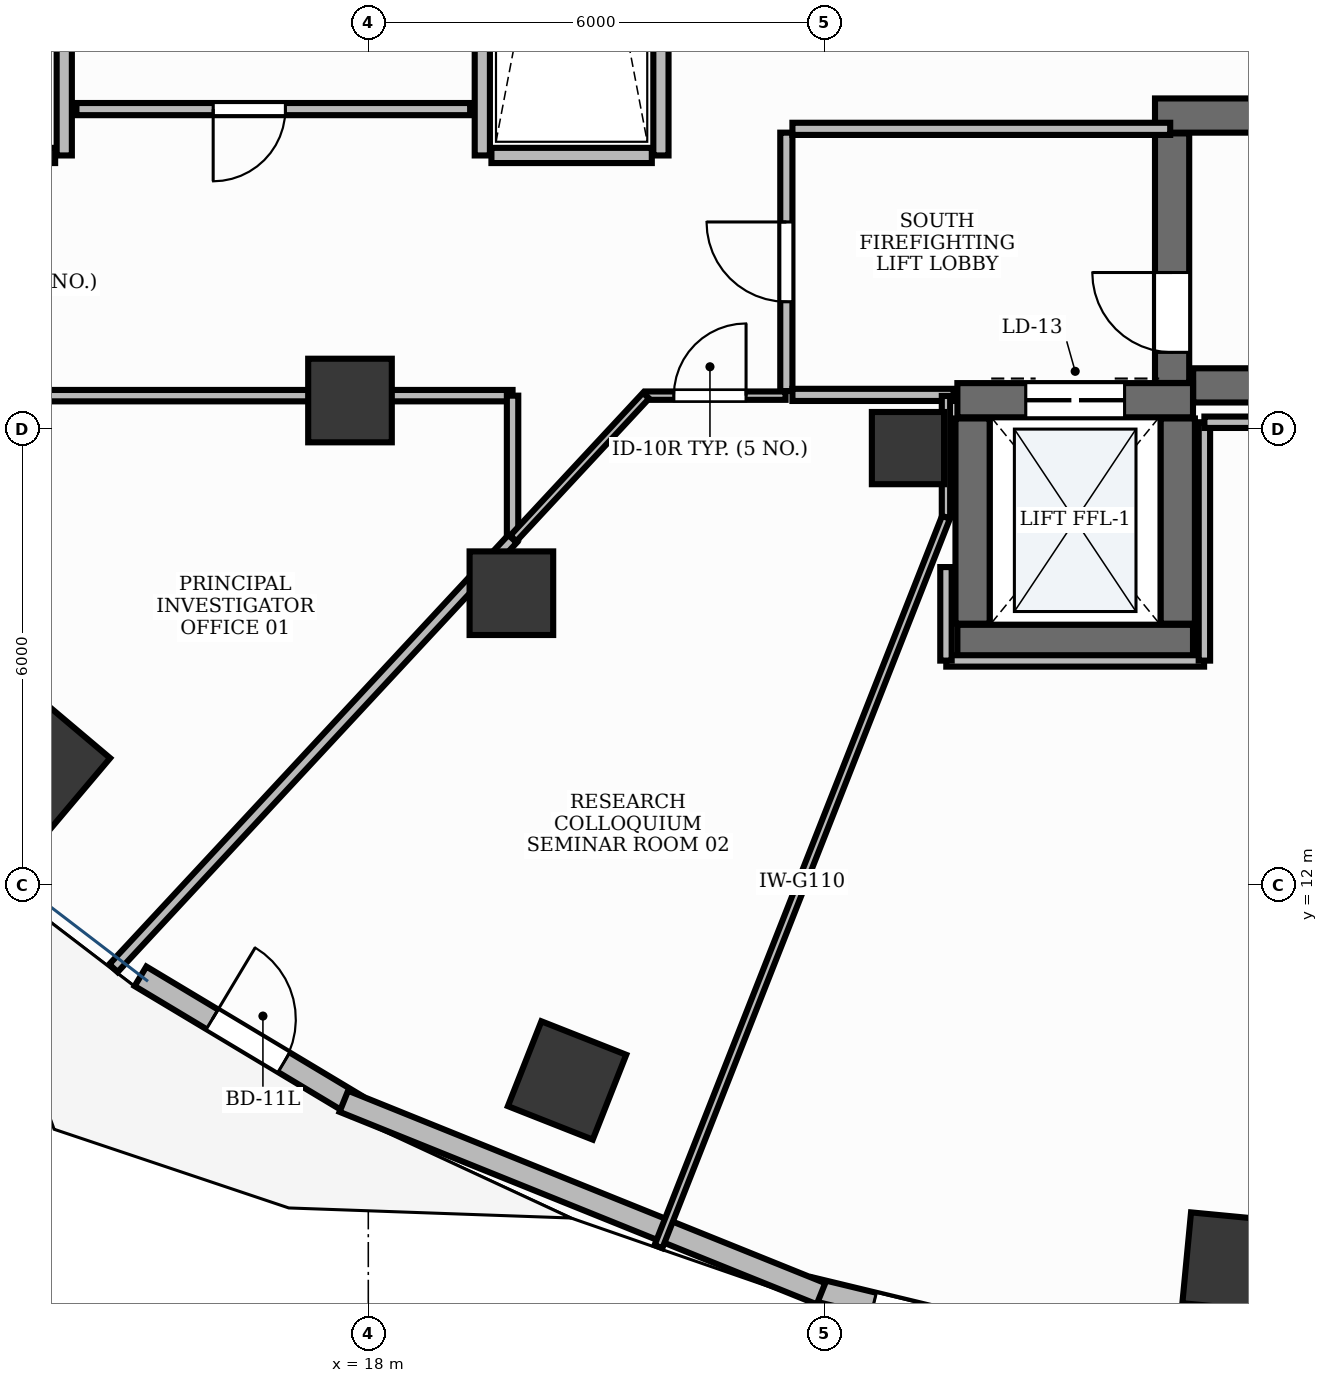
"""IFC4 building model, lengths in metres.
Left out: names, types, materials, properties, quantities, classifications, styles, units other than length and angle.
Written with IfcOpenShell. Run it as: python <this file> out.ifc"""

import sys

from ifc_helpers import new_model, si_unit, direction, frame, frame_2d, origin, origin_2d, place, context, subcontext, project, spatial, rectangle, extrude, element, fill, save


model = new_model("IFC4")
c1 = context("Model", 3, precision=1e-05, world=origin(), true_north=direction((0.0, 1.0)))
c2 = subcontext(c1, "Body", "Model", "MODEL_VIEW")
j1 = project(units=[si_unit("LENGTHUNIT", "METRE"), si_unit("PLANEANGLEUNIT", "RADIAN")], contexts=[c1])
p1 = place(None, origin())
s1 = spatial("IfcSite", under=j1, at=p1, CompositionType="ELEMENT")
p2 = place(p1, origin())
s2 = spatial("IfcBuilding", under=s1, at=p2, CompositionType="ELEMENT")
p3 = place(p2, frame((0.0, 0.0, 102.6)))
s3 = spatial("IfcBuildingStorey", under=s2, at=p3, CompositionType="ELEMENT", Elevation=102.6)
p4 = place(p3, frame((28.852, 18.575, 0.0), z_axis=(0.0, 0.0, 1.0), x_axis=(1.0, 0.0, 0.0)))
e1 = element("IfcWall", 1, at=p4, inside=s3, PredefinedType="SHEAR", context=c2, shape_type="SweptSolid", body=[
    extrude(rectangle(XDim=8.248, YDim=0.45, at=frame_2d((4.124, 0.0))), origin(), (0.0, 0.0, 1.0), 3.9),
])
p5 = place(p3, frame((28.35, 22.125, 0.0), z_axis=(0.0, 0.0, 1.0), x_axis=(1.0, 0.0, 0.0)))
e2 = element("IfcWall", 2, at=p5, inside=s3, PredefinedType="SHEAR", context=c2, shape_type="SweptSolid", body=[
    extrude(rectangle(XDim=8.75, YDim=0.45, at=frame_2d((4.375, 0.0))), origin(), (0.0, 0.0, 1.0), 3.9),
])
p6 = place(p3, frame((28.575, 18.607, 0.0), z_axis=(0.0, 0.0, 1.0), x_axis=(0.0, 1.0, 0.0)))
e3 = element("IfcWall", 3, at=p6, inside=s3, PredefinedType="SHEAR", context=c2, shape_type="SweptSolid", body=[
    extrude(rectangle(XDim=3.283, YDim=0.45, at=frame_2d((1.642, 0.0))), origin(), (0.0, 0.0, 1.0), 3.9),
])
p7 = place(p6, frame((0.403, 0.0, 0.0)))
e4 = element("IfcOpeningElement", 4, at=p7, cuts=e3, PredefinedType="OPENING", context=c2, shape_type="SweptSolid", body=[
    extrude(rectangle(XDim=1.05, YDim=2.15, at=frame_2d((0.525, 1.075))), frame((0.0, 0.24, 0.0), z_axis=(0.0, -1.0, 0.0), x_axis=(1.0, 0.0, 0.0)), (0.0, 0.0, 1.0), 0.48),
])
p8 = place(p3, frame((25.75, 15.2, 0.0), z_axis=(0.0, 0.0, 1.0), x_axis=(1.0, 0.0, 0.0)))
e5 = element("IfcWall", 5, at=p8, inside=s3, PredefinedType="SHEAR", context=c2, shape_type="SweptSolid", body=[
    extrude(rectangle(XDim=3.1, YDim=0.45, at=frame_2d((1.55, 0.0))), origin(), (0.0, 0.0, 1.0), 3.9),
])
p9 = place(p3, frame((25.75, 18.38, 0.0), z_axis=(0.0, 0.0, 1.0), x_axis=(1.0, 0.0, 0.0)))
e6 = element("IfcWall", 6, at=p9, inside=s3, PredefinedType="SHEAR", context=c2, shape_type="SweptSolid", body=[
    extrude(rectangle(XDim=3.1, YDim=0.45, at=frame_2d((1.55, 0.0))), origin(), (0.0, 0.0, 1.0), 3.9),
])
p10 = place(p9, frame((0.9, 0.0, 0.0)))
e7 = element("IfcOpeningElement", 7, at=p10, cuts=e6, PredefinedType="OPENING", context=c2, shape_type="SweptSolid", body=[
    extrude(rectangle(XDim=1.3, YDim=2.2, at=frame_2d((0.65, 1.1))), frame((0.0, 0.24, 0.0), z_axis=(0.0, -1.0, 0.0), x_axis=(1.0, 0.0, 0.0)), (0.0, 0.0, 1.0), 0.48),
])
for number, where, z_axis, x_axis in (
    (8, (25.95, 15.44, 0.0), (0.0, 0.0, 1.0), (0.0, 1.0, 0.0)),
    (9, (28.65, 15.44, 0.0), (0.0, 0.0, 1.0), (0.0, 1.0, 0.0)),
):
    element("IfcWall", number, at=place(p3, frame(where, z_axis=z_axis, x_axis=x_axis)), inside=s3, PredefinedType="SHEAR", context=c2, shape_type="SweptSolid", body=[
        extrude(rectangle(XDim=2.7, YDim=0.45, at=frame_2d((1.35, 0.0))), origin(), (0.0, 0.0, 1.0), 3.9),
    ])
p11 = place(p3, frame((25.1, 17.75, -0.0), z_axis=(0.0, 0.0, 1.0), x_axis=(1.0, 0.0, 0.0)))
e10 = element("IfcColumn", 10, at=p11, inside=s3, PredefinedType="PILASTER", context=c2, shape_type="SweptSolid", body=[
    extrude(rectangle(XDim=0.95, YDim=0.95, at=origin_2d()), origin(), (0.0, 0.0, 1.0), 3.901),
])
p12 = place(p3, frame((17.759, 18.376, -0.0), z_axis=(0.0, 0.0, 1.0), x_axis=(1.0, 0.0, 0.0)))
e11 = element("IfcColumn", 11, at=p12, inside=s3, PredefinedType="COLUMN", context=c2, shape_type="SweptSolid", body=[
    extrude(rectangle(XDim=1.1, YDim=1.1, at=origin_2d()), origin(), (0.0, 0.0, 1.0), 3.901),
])
p13 = place(p3, frame((13.758, 13.6, -0.0), z_axis=(0.0, 0.0, 1.0), x_axis=(-0.764246456939, 0.644924300253, 0.0)))
e12 = element("IfcColumn", 12, at=p13, inside=s3, PredefinedType="COLUMN", context=c2, shape_type="SweptSolid", body=[
    extrude(rectangle(XDim=1.2, YDim=1.2, at=origin_2d()), origin(), (0.0, 0.0, 1.0), 3.901),
])
p14 = place(p3, frame((19.883, 15.841, -0.0), z_axis=(0.0, 0.0, 1.0), x_axis=(1.0, 0.0, 0.0)))
e13 = element("IfcColumn", 13, at=p14, inside=s3, PredefinedType="COLUMN", context=c2, shape_type="SweptSolid", body=[
    extrude(rectangle(XDim=1.1, YDim=1.1, at=origin_2d()), origin(), (0.0, 0.0, 1.0), 3.901),
])
for number, where, z_axis, x_axis in (
    (14, (20.615, 9.431, -0.0), (0.0, 0.0, 1.0), (-0.93, 0.367, 0.0)),
    (15, (29.364, 7.041, -0.0), (0.0, 0.0, 1.0), (-0.995, 0.095, 0.0)),
):
    element("IfcColumn", number, at=place(p3, frame(where, z_axis=z_axis, x_axis=x_axis)), inside=s3, PredefinedType="COLUMN", context=c2, shape_type="SweptSolid", body=[
        extrude(rectangle(XDim=1.2, YDim=1.2, at=origin_2d()), origin(), (0.0, 0.0, 1.0), 3.901),
    ])
p15 = place(p3, frame((15.003, 10.801, 0.0), z_axis=(0.0, 0.0, 1.0), x_axis=(0.85758429223, -0.514343447242, 0.0)))
e16 = element("IfcWall", 16, at=p15, inside=s3, PredefinedType="STANDARD", context=c2, shape_type="SweptSolid", body=[
    extrude(rectangle(XDim=3.3, YDim=0.3, at=frame_2d((1.65, 0.0))), origin(), (0.0, 0.0, 1.0), 3.9),
])
p16 = place(p15, frame((1.1, 0.0, 0.0)))
e17 = element("IfcOpeningElement", 17, at=p16, cuts=e16, PredefinedType="OPENING", context=c2, shape_type="SweptSolid", body=[
    extrude(rectangle(XDim=1.1, YDim=2.15, at=frame_2d((0.55, 1.075))), frame((0.0, 0.165, 0.0), z_axis=(0.0, -1.0, 0.0), x_axis=(1.0, 0.0, 0.0)), (0.0, 0.0, 1.0), 0.33),
])
p17 = place(p3, frame((23.809, 6.695, 0.0), z_axis=(0.0, 0.0, 1.0), x_axis=(0.972049000874, -0.234778065203, 0.0)))
e18 = element("IfcWall", 18, at=p17, inside=s3, PredefinedType="STANDARD", context=c2, shape_type="SweptSolid", body=[
    extrude(rectangle(XDim=3.528, YDim=0.3, at=frame_2d((1.764, 0.0))), origin(), (0.0, 0.0, 1.0), 3.9),
])
p18 = place(p17, frame((0.864, 0.0, 0.9)))
e19 = element("IfcOpeningElement", 19, at=p18, cuts=e18, PredefinedType="OPENING", context=c2, shape_type="SweptSolid", body=[
    extrude(rectangle(XDim=1.8, YDim=2.1, at=frame_2d((0.9, 1.05))), frame((0.0, 0.165, 0.0), z_axis=(0.0, -1.0, 0.0), x_axis=(1.0, 0.0, 0.0)), (0.0, 0.0, 1.0), 0.33),
])
p19 = place(p3, frame((17.678, 9.157, 0.0), z_axis=(0.0, 0.0, 1.0), x_axis=(0.927423312416, -0.374013368194, 0.0)))
e20 = element("IfcWall", 20, at=p19, inside=s3, PredefinedType="STANDARD", context=c2, shape_type="SweptSolid", body=[
    extrude(rectangle(XDim=6.769, YDim=0.3, at=frame_2d((3.385, 0.0))), origin(), (0.0, 0.0, 1.0), 3.47),
])
p20 = place(p3, frame((14.0, 21.6, 0.0), z_axis=(0.0, 0.0, 1.0), x_axis=(0.0, 1.0, 0.0)))
e21 = element("IfcWall", 21, at=p20, inside=s3, PredefinedType="PARTITIONING", context=c2, shape_type="SweptSolid", body=[
    extrude(rectangle(XDim=10.8, YDim=0.2, at=frame_2d((5.4, 0.0))), origin(), (0.0, 0.0, 1.0), 2.91),
])
p21 = place(p3, frame((11.72, 21.6, 0.0), z_axis=(0.0, 0.0, 1.0), x_axis=(1.0, 0.0, 0.0)))
e22 = element("IfcWall", 22, at=p21, inside=s3, PredefinedType="PARTITIONING", context=c2, shape_type="SweptSolid", body=[
    extrude(rectangle(XDim=2.16, YDim=0.2, at=frame_2d((1.08, 0.0))), origin(), (0.0, 0.0, 1.0), 2.91),
])
for number, where, z_axis, x_axis in (
    (23, (19.5, 21.6, 0.0), (0.0, 0.0, 1.0), (0.0, 1.0, 0.0)),
    (24, (21.85, 21.6, 0.0), (0.0, 0.0, 1.0), (0.0, 1.0, 0.0)),
):
    element("IfcWall", number, at=place(p3, frame(where, z_axis=z_axis, x_axis=x_axis)), inside=s3, PredefinedType="PARTITIONING", context=c2, shape_type="SweptSolid", body=[
        extrude(rectangle(XDim=10.8, YDim=0.2, at=frame_2d((5.4, 0.0))), origin(), (0.0, 0.0, 1.0), 2.91),
    ])
p22 = place(p3, frame((19.62, 21.6, 0.0), z_axis=(0.0, 0.0, 1.0), x_axis=(1.0, 0.0, 0.0)))
e25 = element("IfcWall", 25, at=p22, inside=s3, PredefinedType="PARTITIONING", context=c2, shape_type="SweptSolid", body=[
    extrude(rectangle(XDim=2.11, YDim=0.2, at=frame_2d((1.055, 0.0))), origin(), (0.0, 0.0, 1.0), 2.91),
])
p23 = place(p3, frame((23.5, 18.5, 0.0), z_axis=(0.0, 0.0, 1.0), x_axis=(0.0, 1.0, 0.0)))
e26 = element("IfcWall", 26, at=p23, inside=s3, PredefinedType="PARTITIONING", context=c2, shape_type="SweptSolid", body=[
    extrude(rectangle(XDim=3.4, YDim=0.16, at=frame_2d((1.7, 0.0))), origin(), (0.0, 0.0, 1.0), 2.91),
])
p24 = place(p23, frame((1.175, 0.0, 0.0)))
e27 = element("IfcOpeningElement", 27, at=p24, cuts=e26, PredefinedType="OPENING", context=c2, shape_type="SweptSolid", body=[
    extrude(rectangle(XDim=1.05, YDim=2.15, at=frame_2d((0.525, 1.075))), frame((0.0, 0.095, 0.0), z_axis=(0.0, -1.0, 0.0), x_axis=(1.0, 0.0, 0.0)), (0.0, 0.0, 1.0), 0.19),
])
p25 = place(p3, frame((23.58, 21.95, 0.0), z_axis=(0.0, 0.0, 1.0), x_axis=(1.0, 0.0, 0.0)))
e28 = element("IfcWall", 28, at=p25, inside=s3, PredefinedType="PARTITIONING", context=c2, shape_type="SweptSolid", body=[
    extrude(rectangle(XDim=4.97, YDim=0.16, at=frame_2d((2.485, 0.0))), origin(), (0.0, 0.0, 1.0), 2.91),
])
p26 = place(p3, frame((23.58, 18.45, 0.0), z_axis=(0.0, 0.0, 1.0), x_axis=(1.0, 0.0, 0.0)))
e29 = element("IfcWall", 29, at=p26, inside=s3, PredefinedType="PARTITIONING", context=c2, shape_type="SweptSolid", body=[
    extrude(rectangle(XDim=2.12, YDim=0.16, at=frame_2d((1.06, 0.0))), origin(), (0.0, 0.0, 1.0), 2.91),
])
p27 = place(p3, frame((11.59, 18.44, 0.0), z_axis=(0.0, 0.0, 1.0), x_axis=(1.0, 0.0, 0.0)))
e30 = element("IfcWall", 30, at=p27, inside=s3, PredefinedType="PARTITIONING", context=c2, shape_type="SweptSolid", body=[
    extrude(rectangle(XDim=8.308, YDim=0.15, at=frame_2d((4.154, 0.0))), origin(), (0.0, 0.0, 1.0), 2.91),
])
p28 = place(p27, frame((1.095, 0.0, 0.0)))
e31 = element("IfcOpeningElement", 31, at=p28, cuts=e30, PredefinedType="OPENING", context=c2, shape_type="SweptSolid", body=[
    extrude(rectangle(XDim=0.95, YDim=2.15, at=frame_2d((0.475, 1.075))), frame((0.0, 0.09, 0.0), z_axis=(0.0, -1.0, 0.0), x_axis=(1.0, 0.0, 0.0)), (0.0, 0.0, 1.0), 0.18),
])
p29 = place(p3, frame((21.654, 18.44, 0.0), z_axis=(0.0, 0.0, 1.0), x_axis=(1.0, 0.0, 0.0)))
e32 = element("IfcWall", 32, at=p29, inside=s3, PredefinedType="MOVABLE", context=c2, shape_type="SweptSolid", body=[
    extrude(rectangle(XDim=1.836, YDim=0.11, at=frame_2d((0.918, 0.0))), origin(), (0.0, 0.0, 1.0), 2.91),
])
p30 = place(p29, frame((0.366, 0.0, 0.0)))
e33 = element("IfcOpeningElement", 33, at=p30, cuts=e32, PredefinedType="OPENING", context=c2, shape_type="SweptSolid", body=[
    extrude(rectangle(XDim=0.95, YDim=2.15, at=frame_2d((0.475, 1.075))), frame((0.0, 0.07, 0.0), z_axis=(0.0, -1.0, 0.0), x_axis=(1.0, 0.0, 0.0)), (0.0, 0.0, 1.0), 0.14),
])
p31 = place(p3, frame((19.34, 22.21, 0.0), z_axis=(0.0, 0.0, 1.0), x_axis=(-1.0, 0.0, 0.0)))
e34 = element("IfcWall", 34, at=p31, inside=s3, PredefinedType="PARTITIONING", context=c2, shape_type="SweptSolid", body=[
    extrude(rectangle(XDim=5.18, YDim=0.16, at=frame_2d((2.59, 0.0))), origin(), (0.0, 0.0, 1.0), 2.91),
])
p32 = place(p31, frame((2.431, 0.0, 0.0)))
e35 = element("IfcOpeningElement", 35, at=p32, cuts=e34, PredefinedType="OPENING", context=c2, shape_type="SweptSolid", body=[
    extrude(rectangle(XDim=0.95, YDim=2.15, at=frame_2d((0.475, 1.075))), frame((0.0, 0.095, 0.0), z_axis=(0.0, -1.0, 0.0), x_axis=(1.0, 0.0, 0.0)), (0.0, 0.0, 1.0), 0.19),
])
p33 = place(p3, frame((19.898, 18.44, 0.0), z_axis=(0.0, 0.0, 1.0), x_axis=(0.0, -1.0, 0.0)))
e36 = element("IfcWall", 36, at=p33, inside=s3, PredefinedType="PARTITIONING", context=c2, shape_type="SweptSolid", body=[
    extrude(rectangle(XDim=1.883, YDim=0.15, at=frame_2d((0.941, 0.0))), origin(), (0.0, 0.0, 1.0), 2.91),
])
p34 = place(p3, frame((19.898, 16.557, 0.0), z_axis=(0.0, 0.0, 1.0), x_axis=(-0.680804342242, -0.732465321762, 0.0)))
e37 = element("IfcWall", 37, at=p34, inside=s3, PredefinedType="PARTITIONING", context=c2, shape_type="SweptSolid", body=[
    extrude(rectangle(XDim=7.713, YDim=0.15, at=frame_2d((3.856, 0.0))), origin(), (0.0, 0.0, 1.0), 2.91),
])
p35 = place(p3, frame((25.6, 18.436, 0.0), z_axis=(0.0, 0.0, 1.0), x_axis=(0.0, -1.0, 0.0)))
e38 = element("IfcWall", 38, at=p35, inside=s3, PredefinedType="MOVABLE", context=c2, shape_type="SweptSolid", body=[
    extrude(rectangle(XDim=1.597, YDim=0.11, at=frame_2d((0.798, 0.0))), origin(), (0.0, 0.0, 1.0), 2.91),
])
p36 = place(p3, frame((25.6, 16.839, 0.0), z_axis=(0.0, 0.0, 1.0), x_axis=(-0.366770390094, -0.930311496731, 0.0)))
e39 = element("IfcWall", 39, at=p36, inside=s3, PredefinedType="MOVABLE", context=c2, shape_type="SweptSolid", body=[
    extrude(rectangle(XDim=10.314, YDim=0.11, at=frame_2d((5.157, 0.0))), origin(), (0.0, 0.0, 1.0), 2.91),
])
p37 = place(p3, frame((19.908, 16.562, 0.0), z_axis=(0.0, 0.0, 1.0), x_axis=(0.6808344478, 0.732437338404, 0.0)))
e40 = element("IfcWall", 40, at=p37, inside=s3, PredefinedType="MOVABLE", context=c2, shape_type="SweptSolid", body=[
    extrude(rectangle(XDim=2.564, YDim=0.11, at=frame_2d((1.282, 0.0))), origin(), (0.0, 0.0, 1.0), 2.91),
])
p38 = place(p3, frame((25.604, 14.95, 0.0), z_axis=(0.0, 0.0, 1.0), x_axis=(1.0, 0.0, 0.0)))
e41 = element("IfcWall", 41, at=p38, inside=s3, PredefinedType="PARTITIONING", context=c2, shape_type="SweptSolid", body=[
    extrude(rectangle(XDim=3.392, YDim=0.15, at=frame_2d((1.696, 0.0))), origin(), (0.0, 0.0, 1.0), 2.91),
])
p39 = place(p3, frame((29.0, 14.954, 0.0), z_axis=(0.0, 0.0, 1.0), x_axis=(0.0, 1.0, 0.0)))
e42 = element("IfcWall", 42, at=p39, inside=s3, PredefinedType="PARTITIONING", context=c2, shape_type="SweptSolid", body=[
    extrude(rectangle(XDim=3.136, YDim=0.15, at=frame_2d((1.568, 0.0))), origin(), (0.0, 0.0, 1.0), 2.91),
])
p40 = place(p3, frame((29.0, 18.09, 0.0), z_axis=(0.0, 0.0, 1.0), x_axis=(1.0, 0.0, 0.0)))
e43 = element("IfcWall", 43, at=p40, inside=s3, PredefinedType="PARTITIONING", context=c2, shape_type="SweptSolid", body=[
    extrude(rectangle(XDim=8.35, YDim=0.15, at=frame_2d((4.175, 0.0))), origin(), (0.0, 0.0, 1.0), 2.91),
])
p41 = place(p3, frame((25.6, 16.185, 0.0), z_axis=(0.0, 0.0, 1.0), x_axis=(0.0, -1.0, 0.0)))
e44 = element("IfcWall", 44, at=p41, inside=s3, PredefinedType="PARTITIONING", context=c2, shape_type="SweptSolid", body=[
    extrude(rectangle(XDim=1.231, YDim=0.15, at=frame_2d((0.615, 0.0))), origin(), (0.0, 0.0, 1.0), 2.91),
])
p42 = place(p16, origin())
e45 = element("IfcDoor", 45, at=p42, inside=s3, OperationType="SINGLE_SWING_LEFT", PredefinedType="DOOR", context=c2, shape_type="SweptSolid", body=[
    extrude(rectangle(XDim=1.1, YDim=2.15, at=frame_2d((0.55, 1.075))), frame((0.0, 0.025, 0.0), z_axis=(0.0, -1.0, 0.0), x_axis=(1.0, 0.0, 0.0)), (0.0, 0.0, 1.0), 0.05),
])
fill(e17, e45)
p43 = place(p18, origin())
e46 = element("IfcWindow", 46, at=p43, inside=s3, PartitioningType="SINGLE_PANEL", PredefinedType="WINDOW", context=c2, shape_type="SweptSolid", body=[
    extrude(rectangle(XDim=1.8, YDim=2.1, at=frame_2d((0.9, 1.05))), frame((0.0, 0.03, 0.0), z_axis=(0.0, -1.0, 0.0), x_axis=(1.0, 0.0, 0.0)), (0.0, 0.0, 1.0), 0.06),
])
fill(e19, e46)
p44 = place(p7, origin())
e47 = element("IfcDoor", 47, at=p44, inside=s3, OperationType="SINGLE_SWING_RIGHT", PredefinedType="DOOR", context=c2, shape_type="SweptSolid", body=[
    extrude(rectangle(XDim=1.05, YDim=2.15, at=frame_2d((0.525, 1.075))), frame((0.0, 0.025, 0.0), z_axis=(0.0, -1.0, 0.0), x_axis=(1.0, 0.0, 0.0)), (0.0, 0.0, 1.0), 0.05),
])
fill(e4, e47)
p45 = place(p10, origin())
e48 = element("IfcDoor", 48, at=p45, inside=s3, OperationType="DOUBLE_DOOR_SLIDING", PredefinedType="DOOR", context=c2, shape_type="SweptSolid", body=[
    extrude(rectangle(XDim=1.3, YDim=2.2, at=frame_2d((0.65, 1.1))), frame((0.0, 0.025, 0.0), z_axis=(0.0, -1.0, 0.0), x_axis=(1.0, 0.0, 0.0)), (0.0, 0.0, 1.0), 0.05),
])
fill(e7, e48)
p46 = place(p24, origin())
e49 = element("IfcDoor", 49, at=p46, inside=s3, OperationType="SINGLE_SWING_RIGHT", PredefinedType="DOOR", context=c2, shape_type="SweptSolid", body=[
    extrude(rectangle(XDim=1.05, YDim=2.15, at=frame_2d((0.525, 1.075))), frame((0.0, 0.025, 0.0), z_axis=(0.0, -1.0, 0.0), x_axis=(1.0, 0.0, 0.0)), (0.0, 0.0, 1.0), 0.05),
])
fill(e27, e49)
p47 = place(p30, origin())
e50 = element("IfcDoor", 50, at=p47, inside=s3, OperationType="SINGLE_SWING_RIGHT", PredefinedType="DOOR", context=c2, shape_type="SweptSolid", body=[
    extrude(rectangle(XDim=0.95, YDim=2.15, at=frame_2d((0.475, 1.075))), frame((0.0, 0.025, 0.0), z_axis=(0.0, -1.0, 0.0), x_axis=(1.0, 0.0, 0.0)), (0.0, 0.0, 1.0), 0.05),
])
fill(e33, e50)
p48 = place(p32, origin())
e51 = element("IfcDoor", 51, at=p48, inside=s3, OperationType="SINGLE_SWING_RIGHT", PredefinedType="DOOR", context=c2, shape_type="SweptSolid", body=[
    extrude(rectangle(XDim=0.95, YDim=2.15, at=frame_2d((0.475, 1.075))), frame((0.0, 0.025, 0.0), z_axis=(0.0, -1.0, 0.0), x_axis=(1.0, 0.0, 0.0)), (0.0, 0.0, 1.0), 0.05),
])
fill(e35, e51)
save(model, sys.argv[1])
